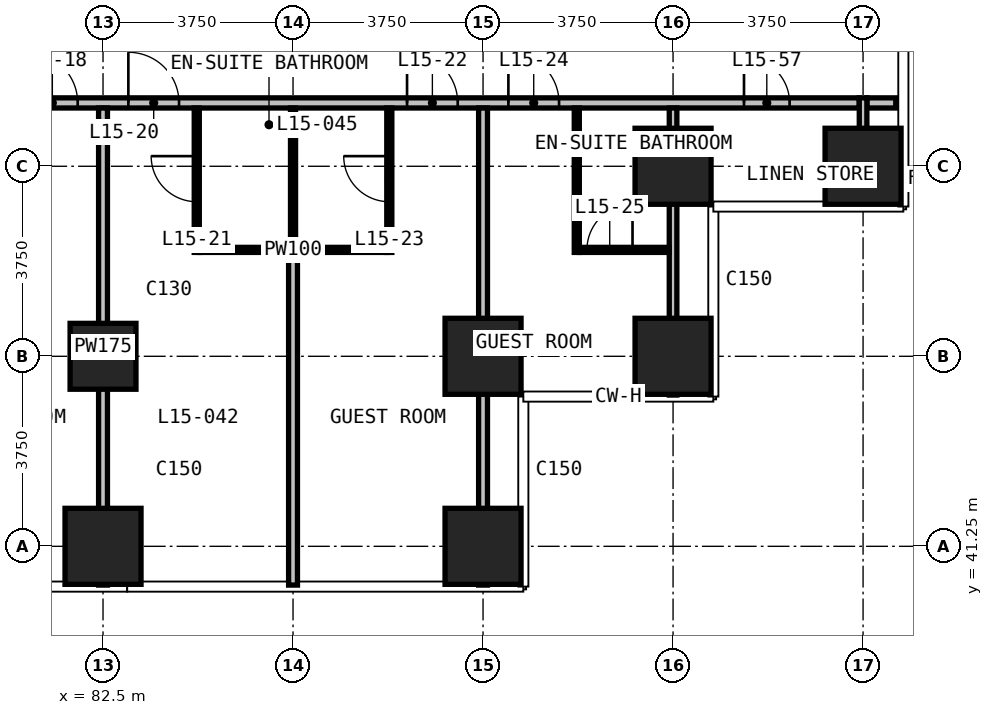
"""IFC4 building model, lengths in metres.
Left out: names, types, materials, properties, quantities, classifications, styles, units other than length and angle.
Written with IfcOpenShell. Run it as: python <this file> out.ifc"""

import sys

from ifc_helpers import new_model, si_unit, direction, frame, frame_2d, origin, origin_2d, place, context, subcontext, project, spatial, rectangle, extrude, element, fill, save


model = new_model("IFC4")
c1 = context("Model", 3, precision=1e-05, world=origin(), true_north=direction((0.0, 1.0)))
c2 = subcontext(c1, "Body", "Model", "MODEL_VIEW")
j1 = project(units=[si_unit("LENGTHUNIT", "METRE"), si_unit("PLANEANGLEUNIT", "RADIAN")], contexts=[c1])
p1 = place(None, origin())
s1 = spatial("IfcSite", under=j1, at=p1, CompositionType="ELEMENT")
p2 = place(p1, origin())
s2 = spatial("IfcBuilding", under=s1, at=p2, CompositionType="ELEMENT")
p3 = place(p2, frame((0.0, 0.0, 69.2)))
s3 = spatial("IfcBuildingStorey", under=s2, at=p3, CompositionType="ELEMENT", Elevation=69.2)
p4 = place(p3, frame((82.5, 41.25, 0.0), z_axis=(0.0, 0.0, 1.0), x_axis=(1.0, 0.0, 0.0)))
e1 = element("IfcColumn", 1, at=p4, inside=s3, PredefinedType="COLUMN", context=c2, shape_type="SweptSolid", body=[
    extrude(rectangle(XDim=1.5, YDim=1.5, at=origin_2d()), origin(), (0.0, 0.0, 1.0), 3.3),
])
p5 = place(p3, frame((82.5, 45.0, 0.0), z_axis=(0.0, 0.0, 1.0), x_axis=(1.0, 0.0, 0.0)))
e2 = element("IfcColumn", 2, at=p5, inside=s3, PredefinedType="COLUMN", context=c2, shape_type="SweptSolid", body=[
    extrude(rectangle(XDim=1.3, YDim=1.3, at=origin_2d()), origin(), (0.0, 0.0, 1.0), 3.3),
])
for number, where, z_axis, x_axis in (
    (3, (90.0, 41.25, 0.0), (0.0, 0.0, 1.0), (1.0, 0.0, 0.0)),
    (4, (90.0, 45.0, 0.0), (0.0, 0.0, 1.0), (1.0, 0.0, 0.0)),
    (5, (93.75, 45.0, 0.0), (0.0, 0.0, 1.0), (1.0, 0.0, 0.0)),
    (6, (93.75, 48.75, 0.0), (0.0, 0.0, 1.0), (1.0, 0.0, 0.0)),
    (7, (97.5, 48.75, 0.0), (0.0, 0.0, 1.0), (1.0, 0.0, 0.0)),
):
    element("IfcColumn", number, at=place(p3, frame(where, z_axis=z_axis, x_axis=x_axis)), inside=s3, PredefinedType="COLUMN", context=c2, shape_type="SweptSolid", body=[
        extrude(rectangle(XDim=1.5, YDim=1.5, at=origin_2d()), origin(), (0.0, 0.0, 1.0), 3.3),
    ])
p6 = place(p3, frame((52.575, 50.0, 0.0), z_axis=(0.0, 0.0, 1.0), x_axis=(1.0, 0.0, 0.0)))
e8 = element("IfcWall", 8, at=p6, inside=s3, PredefinedType="PARTITIONING", context=c2, shape_type="SweptSolid", body=[
    extrude(rectangle(XDim=44.85, YDim=0.2, at=frame_2d((22.425, 0.0))), origin(), (0.0, 0.0, 1.0), 3.0),
])
p7 = place(p6, frame((5.925, 0.0, 0.0)))
e9 = element("IfcOpeningElement", 9, at=p7, cuts=e8, PredefinedType="OPENING", context=c2, shape_type="SweptSolid", body=[
    extrude(rectangle(XDim=1.0, YDim=2.2, at=frame_2d((0.5, 1.1))), frame((0.0, 0.11, 0.0), z_axis=(0.0, -1.0, 0.0), x_axis=(1.0, 0.0, 0.0)), (0.0, 0.0, 1.0), 0.22),
])
p8 = place(p6, frame((7.925, 0.0, 0.0)))
e10 = element("IfcOpeningElement", 10, at=p8, cuts=e8, PredefinedType="OPENING", context=c2, shape_type="SweptSolid", body=[
    extrude(rectangle(XDim=1.0, YDim=2.2, at=frame_2d((0.5, 1.1))), frame((0.0, 0.11, 0.0), z_axis=(0.0, -1.0, 0.0), x_axis=(1.0, 0.0, 0.0)), (0.0, 0.0, 1.0), 0.22),
])
p9 = place(p6, frame((13.425, 0.0, 0.0)))
e11 = element("IfcOpeningElement", 11, at=p9, cuts=e8, PredefinedType="OPENING", context=c2, shape_type="SweptSolid", body=[
    extrude(rectangle(XDim=1.0, YDim=2.2, at=frame_2d((0.5, 1.1))), frame((0.0, 0.11, 0.0), z_axis=(0.0, -1.0, 0.0), x_axis=(1.0, 0.0, 0.0)), (0.0, 0.0, 1.0), 0.22),
])
p10 = place(p6, frame((15.425, 0.0, 0.0)))
e12 = element("IfcOpeningElement", 12, at=p10, cuts=e8, PredefinedType="OPENING", context=c2, shape_type="SweptSolid", body=[
    extrude(rectangle(XDim=1.0, YDim=2.2, at=frame_2d((0.5, 1.1))), frame((0.0, 0.11, 0.0), z_axis=(0.0, -1.0, 0.0), x_axis=(1.0, 0.0, 0.0)), (0.0, 0.0, 1.0), 0.22),
])
p11 = place(p6, frame((20.925, 0.0, 0.0)))
e13 = element("IfcOpeningElement", 13, at=p11, cuts=e8, PredefinedType="OPENING", context=c2, shape_type="SweptSolid", body=[
    extrude(rectangle(XDim=1.0, YDim=2.2, at=frame_2d((0.5, 1.1))), frame((0.0, 0.11, 0.0), z_axis=(0.0, -1.0, 0.0), x_axis=(1.0, 0.0, 0.0)), (0.0, 0.0, 1.0), 0.22),
])
p12 = place(p6, frame((22.925, 0.0, 0.0)))
e14 = element("IfcOpeningElement", 14, at=p12, cuts=e8, PredefinedType="OPENING", context=c2, shape_type="SweptSolid", body=[
    extrude(rectangle(XDim=1.0, YDim=2.2, at=frame_2d((0.5, 1.1))), frame((0.0, 0.11, 0.0), z_axis=(0.0, -1.0, 0.0), x_axis=(1.0, 0.0, 0.0)), (0.0, 0.0, 1.0), 0.22),
])
p13 = place(p6, frame((28.425, 0.0, 0.0)))
e15 = element("IfcOpeningElement", 15, at=p13, cuts=e8, PredefinedType="OPENING", context=c2, shape_type="SweptSolid", body=[
    extrude(rectangle(XDim=1.0, YDim=2.2, at=frame_2d((0.5, 1.1))), frame((0.0, 0.11, 0.0), z_axis=(0.0, -1.0, 0.0), x_axis=(1.0, 0.0, 0.0)), (0.0, 0.0, 1.0), 0.22),
])
p14 = place(p6, frame((30.425, 0.0, 0.0)))
e16 = element("IfcOpeningElement", 16, at=p14, cuts=e8, PredefinedType="OPENING", context=c2, shape_type="SweptSolid", body=[
    extrude(rectangle(XDim=1.0, YDim=2.2, at=frame_2d((0.5, 1.1))), frame((0.0, 0.11, 0.0), z_axis=(0.0, -1.0, 0.0), x_axis=(1.0, 0.0, 0.0)), (0.0, 0.0, 1.0), 0.22),
])
p15 = place(p6, frame((35.925, 0.0, 0.0)))
e17 = element("IfcOpeningElement", 17, at=p15, cuts=e8, PredefinedType="OPENING", context=c2, shape_type="SweptSolid", body=[
    extrude(rectangle(XDim=1.0, YDim=2.2, at=frame_2d((0.5, 1.1))), frame((0.0, 0.11, 0.0), z_axis=(0.0, -1.0, 0.0), x_axis=(1.0, 0.0, 0.0)), (0.0, 0.0, 1.0), 0.22),
])
p16 = place(p6, frame((37.925, 0.0, 0.0)))
e18 = element("IfcOpeningElement", 18, at=p16, cuts=e8, PredefinedType="OPENING", context=c2, shape_type="SweptSolid", body=[
    extrude(rectangle(XDim=1.0, YDim=2.2, at=frame_2d((0.5, 1.1))), frame((0.0, 0.11, 0.0), z_axis=(0.0, -1.0, 0.0), x_axis=(1.0, 0.0, 0.0)), (0.0, 0.0, 1.0), 0.22),
])
p17 = place(p6, frame((1.4, 0.0, 0.0)))
e19 = element("IfcOpeningElement", 19, at=p17, cuts=e8, PredefinedType="OPENING", context=c2, shape_type="SweptSolid", body=[
    extrude(rectangle(XDim=0.9, YDim=2.2, at=frame_2d((0.45, 1.1))), frame((0.0, 0.11, 0.0), z_axis=(0.0, -1.0, 0.0), x_axis=(1.0, 0.0, 0.0)), (0.0, 0.0, 1.0), 0.22),
])
p18 = place(p6, frame((42.575, 0.0, 0.0)))
e20 = element("IfcOpeningElement", 20, at=p18, cuts=e8, PredefinedType="OPENING", context=c2, shape_type="SweptSolid", body=[
    extrude(rectangle(XDim=0.9, YDim=2.2, at=frame_2d((0.45, 1.1))), frame((0.0, 0.11, 0.0), z_axis=(0.0, -1.0, 0.0), x_axis=(1.0, 0.0, 0.0)), (0.0, 0.0, 1.0), 0.22),
])
p19 = place(p3, frame((97.575, 50.0, 0.0), z_axis=(0.0, 0.0, 1.0), x_axis=(1.0, 0.0, 0.0)))
e21 = element("IfcWall", 21, at=p19, inside=s3, PredefinedType="PARTITIONING", context=c2, shape_type="SweptSolid", body=[
    extrude(rectangle(XDim=0.57, YDim=0.2, at=frame_2d((0.285, 0.0))), origin(), (0.0, 0.0, 1.0), 3.0),
])
p20 = place(p3, frame((82.5, 40.485, 0.0), z_axis=(0.0, 0.0, 1.0), x_axis=(0.0, 1.0, 0.0)))
e22 = element("IfcWall", 22, at=p20, inside=s3, PredefinedType="PARTITIONING", context=c2, shape_type="SweptSolid", body=[
    extrude(rectangle(XDim=9.415, YDim=0.175, at=frame_2d((4.708, 0.0))), origin(), (0.0, 0.0, 1.0), 3.0),
])
p21 = place(p3, frame((86.25, 40.485, 0.0), z_axis=(0.0, 0.0, 1.0), x_axis=(0.0, 1.0, 0.0)))
e23 = element("IfcWall", 23, at=p21, inside=s3, PredefinedType="PARTITIONING", context=c2, shape_type="SweptSolid", body=[
    extrude(rectangle(XDim=6.565, YDim=0.175, at=frame_2d((3.282, 0.0))), origin(), (0.0, 0.0, 1.0), 3.0),
])
p22 = place(p3, frame((90.0, 40.485, 0.0), z_axis=(0.0, 0.0, 1.0), x_axis=(0.0, 1.0, 0.0)))
e24 = element("IfcWall", 24, at=p22, inside=s3, PredefinedType="PARTITIONING", context=c2, shape_type="SweptSolid", body=[
    extrude(rectangle(XDim=9.415, YDim=0.175, at=frame_2d((4.708, 0.0))), origin(), (0.0, 0.0, 1.0), 3.0),
])
p23 = place(p3, frame((93.75, 44.235, 0.0), z_axis=(0.0, 0.0, 1.0), x_axis=(0.0, 1.0, 0.0)))
e25 = element("IfcWall", 25, at=p23, inside=s3, PredefinedType="PARTITIONING", context=c2, shape_type="SweptSolid", body=[
    extrude(rectangle(XDim=5.665, YDim=0.15, at=frame_2d((2.833, 0.0))), origin(), (0.0, 0.0, 1.0), 3.0),
])
p24 = place(p3, frame((97.5, 48.105, 0.0), z_axis=(0.0, 0.0, 1.0), x_axis=(0.0, 1.0, 0.0)))
e26 = element("IfcWall", 26, at=p24, inside=s3, PredefinedType="PARTITIONING", context=c2, shape_type="SweptSolid", body=[
    extrude(rectangle(XDim=1.995, YDim=0.15, at=frame_2d((0.998, 0.0))), origin(), (0.0, 0.0, 1.0), 3.0),
])
p25 = place(p3, frame((84.4, 47.1, 0.0), z_axis=(0.0, 0.0, 1.0), x_axis=(1.0, 0.0, 0.0)))
e27 = element("IfcWall", 27, at=p25, inside=s3, PredefinedType="PARTITIONING", context=c2, shape_type="SweptSolid", body=[
    extrude(rectangle(XDim=3.7, YDim=0.1, at=frame_2d((1.85, 0.0))), origin(), (0.0, 0.0, 1.0), 3.0),
])
p26 = place(p3, frame((91.9, 47.1, 0.0), z_axis=(0.0, 0.0, 1.0), x_axis=(1.0, 0.0, 0.0)))
e28 = element("IfcWall", 28, at=p26, inside=s3, PredefinedType="PARTITIONING", context=c2, shape_type="SweptSolid", body=[
    extrude(rectangle(XDim=1.775, YDim=0.1, at=frame_2d((0.888, 0.0))), origin(), (0.0, 0.0, 1.0), 3.0),
])
p27 = place(p26, frame((0.15, 0.0, 0.0)))
e29 = element("IfcOpeningElement", 29, at=p27, cuts=e28, PredefinedType="OPENING", context=c2, shape_type="SweptSolid", body=[
    extrude(rectangle(XDim=0.9, YDim=2.2, at=frame_2d((0.45, 1.1))), frame((0.0, 0.06, 0.0), z_axis=(0.0, -1.0, 0.0), x_axis=(1.0, 0.0, 0.0)), (0.0, 0.0, 1.0), 0.12),
])
p28 = place(p3, frame((84.35, 47.05, 0.0), z_axis=(0.0, 0.0, 1.0), x_axis=(0.0, 1.0, 0.0)))
e30 = element("IfcWall", 30, at=p28, inside=s3, PredefinedType="PARTITIONING", context=c2, shape_type="SweptSolid", body=[
    extrude(rectangle(XDim=2.85, YDim=0.1, at=frame_2d((1.425, 0.0))), origin(), (0.0, 0.0, 1.0), 3.0),
])
p29 = place(p28, frame((1.0, 0.0, 0.0)))
e31 = element("IfcOpeningElement", 31, at=p29, cuts=e30, PredefinedType="OPENING", context=c2, shape_type="SweptSolid", body=[
    extrude(rectangle(XDim=0.9, YDim=2.2, at=frame_2d((0.45, 1.1))), frame((0.0, 0.06, 0.0), z_axis=(0.0, -1.0, 0.0), x_axis=(1.0, 0.0, 0.0)), (0.0, 0.0, 1.0), 0.12),
])
p30 = place(p3, frame((86.25, 47.15, 0.0), z_axis=(0.0, 0.0, 1.0), x_axis=(0.0, 1.0, 0.0)))
e32 = element("IfcWall", 32, at=p30, inside=s3, PredefinedType="PARTITIONING", context=c2, shape_type="SweptSolid", body=[
    extrude(rectangle(XDim=2.75, YDim=0.1, at=frame_2d((1.375, 0.0))), origin(), (0.0, 0.0, 1.0), 3.0),
])
p31 = place(p3, frame((88.15, 47.05, 0.0), z_axis=(0.0, 0.0, 1.0), x_axis=(0.0, 1.0, 0.0)))
e33 = element("IfcWall", 33, at=p31, inside=s3, PredefinedType="PARTITIONING", context=c2, shape_type="SweptSolid", body=[
    extrude(rectangle(XDim=2.85, YDim=0.1, at=frame_2d((1.425, 0.0))), origin(), (0.0, 0.0, 1.0), 3.0),
])
p32 = place(p31, frame((1.0, 0.0, 0.0)))
e34 = element("IfcOpeningElement", 34, at=p32, cuts=e33, PredefinedType="OPENING", context=c2, shape_type="SweptSolid", body=[
    extrude(rectangle(XDim=0.9, YDim=2.2, at=frame_2d((0.45, 1.1))), frame((0.0, 0.06, 0.0), z_axis=(0.0, -1.0, 0.0), x_axis=(1.0, 0.0, 0.0)), (0.0, 0.0, 1.0), 0.12),
])
p33 = place(p3, frame((91.85, 47.05, 0.0), z_axis=(0.0, 0.0, 1.0), x_axis=(0.0, 1.0, 0.0)))
e35 = element("IfcWall", 35, at=p33, inside=s3, PredefinedType="PARTITIONING", context=c2, shape_type="SweptSolid", body=[
    extrude(rectangle(XDim=2.85, YDim=0.1, at=frame_2d((1.425, 0.0))), origin(), (0.0, 0.0, 1.0), 3.0),
])
p34 = place(p13, origin())
e36 = element("IfcDoor", 36, at=p34, inside=s3, OperationType="SINGLE_SWING_RIGHT", PredefinedType="DOOR", context=c2, shape_type="SweptSolid", body=[
    extrude(rectangle(XDim=1.0, YDim=2.2, at=frame_2d((0.5, 1.1))), frame((0.0, 0.025, 0.0), z_axis=(0.0, -1.0, 0.0), x_axis=(1.0, 0.0, 0.0)), (0.0, 0.0, 1.0), 0.05),
])
fill(e15, e36)
p35 = place(p14, origin())
e37 = element("IfcDoor", 37, at=p35, inside=s3, OperationType="SINGLE_SWING_RIGHT", PredefinedType="DOOR", context=c2, shape_type="SweptSolid", body=[
    extrude(rectangle(XDim=1.0, YDim=2.2, at=frame_2d((0.5, 1.1))), frame((0.0, 0.025, 0.0), z_axis=(0.0, -1.0, 0.0), x_axis=(1.0, 0.0, 0.0)), (0.0, 0.0, 1.0), 0.05),
])
fill(e16, e37)
p36 = place(p29, origin())
e38 = element("IfcDoor", 38, at=p36, inside=s3, OperationType="SINGLE_SWING_RIGHT", PredefinedType="DOOR", context=c2, shape_type="SweptSolid", body=[
    extrude(rectangle(XDim=0.9, YDim=2.2, at=frame_2d((0.45, 1.1))), frame((0.0, 0.025, 0.0), z_axis=(0.0, -1.0, 0.0), x_axis=(1.0, 0.0, 0.0)), (0.0, 0.0, 1.0), 0.05),
])
fill(e31, e38)
p37 = place(p15, origin())
e39 = element("IfcDoor", 39, at=p37, inside=s3, OperationType="SINGLE_SWING_LEFT", PredefinedType="DOOR", context=c2, shape_type="SweptSolid", body=[
    extrude(rectangle(XDim=1.0, YDim=2.2, at=frame_2d((0.5, 1.1))), frame((0.0, 0.025, 0.0), z_axis=(0.0, -1.0, 0.0), x_axis=(1.0, 0.0, 0.0)), (0.0, 0.0, 1.0), 0.05),
])
fill(e17, e39)
p38 = place(p32, origin())
e40 = element("IfcDoor", 40, at=p38, inside=s3, OperationType="SINGLE_SWING_RIGHT", PredefinedType="DOOR", context=c2, shape_type="SweptSolid", body=[
    extrude(rectangle(XDim=0.9, YDim=2.2, at=frame_2d((0.45, 1.1))), frame((0.0, 0.025, 0.0), z_axis=(0.0, -1.0, 0.0), x_axis=(1.0, 0.0, 0.0)), (0.0, 0.0, 1.0), 0.05),
])
fill(e34, e40)
p39 = place(p16, origin())
e41 = element("IfcDoor", 41, at=p39, inside=s3, OperationType="SINGLE_SWING_LEFT", PredefinedType="DOOR", context=c2, shape_type="SweptSolid", body=[
    extrude(rectangle(XDim=1.0, YDim=2.2, at=frame_2d((0.5, 1.1))), frame((0.0, 0.025, 0.0), z_axis=(0.0, -1.0, 0.0), x_axis=(1.0, 0.0, 0.0)), (0.0, 0.0, 1.0), 0.05),
])
fill(e18, e41)
p40 = place(p27, origin())
e42 = element("IfcDoor", 42, at=p40, inside=s3, OperationType="SINGLE_SWING_RIGHT", PredefinedType="DOOR", context=c2, shape_type="SweptSolid", body=[
    extrude(rectangle(XDim=0.9, YDim=2.2, at=frame_2d((0.45, 1.1))), frame((0.0, 0.025, 0.0), z_axis=(0.0, -1.0, 0.0), x_axis=(1.0, 0.0, 0.0)), (0.0, 0.0, 1.0), 0.05),
])
fill(e29, e42)
p41 = place(p18, origin())
e43 = element("IfcDoor", 43, at=p41, inside=s3, OperationType="SINGLE_SWING_LEFT", PredefinedType="DOOR", context=c2, shape_type="SweptSolid", body=[
    extrude(rectangle(XDim=0.9, YDim=2.2, at=frame_2d((0.45, 1.1))), frame((0.0, 0.025, 0.0), z_axis=(0.0, -1.0, 0.0), x_axis=(1.0, 0.0, 0.0)), (0.0, 0.0, 1.0), 0.05),
])
fill(e20, e43)
save(model, sys.argv[1])
